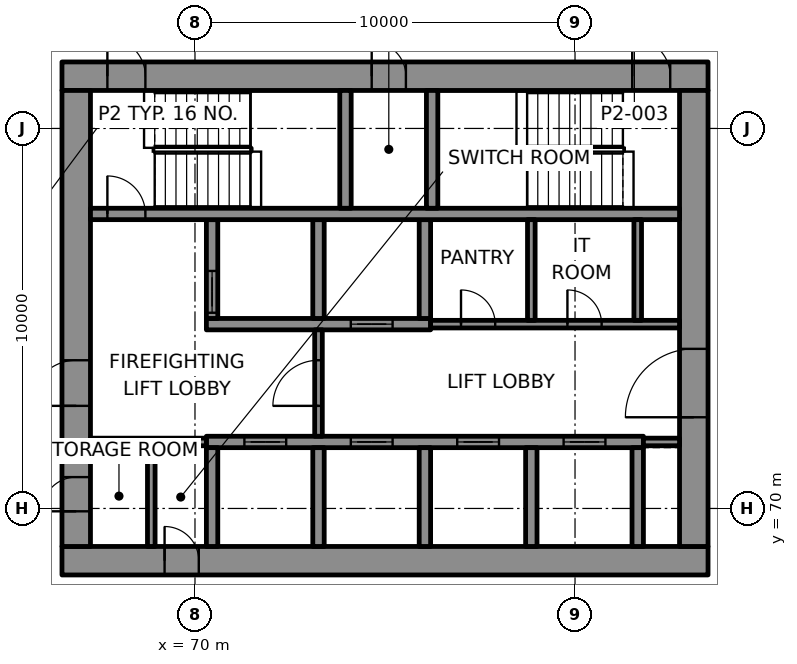
"""IFC4 building model, lengths in metres.
Left out: names, types, materials, properties, quantities, classifications, styles, units other than length and angle.
Written with IfcOpenShell. Run it as: python <this file> out.ifc"""

import sys

from ifc_helpers import new_model, si_unit, direction, frame, frame_2d, origin, place, context, subcontext, project, spatial, rectangle, extrude, element, fill, save


model = new_model("IFC4")
c1 = context("Model", 3, precision=1e-05, world=origin(), true_north=direction((0.0, 1.0)))
c2 = subcontext(c1, "Body", "Model", "MODEL_VIEW")
j1 = project(units=[si_unit("LENGTHUNIT", "METRE"), si_unit("PLANEANGLEUNIT", "RADIAN")], contexts=[c1])
p1 = place(None, origin())
s1 = spatial("IfcSite", under=j1, at=p1, CompositionType="ELEMENT")
p2 = place(p1, origin())
s2 = spatial("IfcBuilding", under=s1, at=p2, CompositionType="ELEMENT")
p3 = place(p2, frame((0.0, 0.0, 305.6)))
s3 = spatial("IfcBuildingStorey", under=s2, at=p3, CompositionType="ELEMENT", Elevation=305.6)
p4 = place(p3, frame((66.5, 68.625, 0.0), z_axis=(0.0, 0.0, 1.0), x_axis=(1.0, 0.0, 0.0)))
e1 = element("IfcWall", 1, at=p4, inside=s3, PredefinedType="SHEAR", context=c2, shape_type="SweptSolid", body=[
    extrude(rectangle(XDim=17.0, YDim=0.75, at=frame_2d((8.5, 0.0))), origin(), (0.0, 0.0, 1.0), 3.3),
])
p5 = place(p4, frame((2.7, 0.0, 0.0)))
e2 = element("IfcOpeningElement", 2, at=p5, cuts=e1, PredefinedType="OPENING", context=c2, shape_type="SweptSolid", body=[
    extrude(rectangle(XDim=0.9, YDim=2.1, at=frame_2d((0.45, 1.05))), frame((0.0, 0.385, 0.0), z_axis=(0.0, -1.0, 0.0), x_axis=(1.0, 0.0, 0.0)), (0.0, 0.0, 1.0), 0.77),
])
p6 = place(p3, frame((66.5, 81.375, 0.0), z_axis=(0.0, 0.0, 1.0), x_axis=(1.0, 0.0, 0.0)))
e3 = element("IfcWall", 3, at=p6, inside=s3, PredefinedType="SHEAR", context=c2, shape_type="SweptSolid", body=[
    extrude(rectangle(XDim=17.0, YDim=0.75, at=frame_2d((8.5, 0.0))), origin(), (0.0, 0.0, 1.0), 3.3),
])
p7 = place(p6, frame((1.195, 0.0, 0.0)))
e4 = element("IfcOpeningElement", 4, at=p7, cuts=e3, PredefinedType="OPENING", context=c2, shape_type="SweptSolid", body=[
    extrude(rectangle(XDim=1.0, YDim=2.1, at=frame_2d((0.5, 1.05))), frame((0.0, 0.385, 0.0), z_axis=(0.0, -1.0, 0.0), x_axis=(1.0, 0.0, 0.0)), (0.0, 0.0, 1.0), 0.77),
])
p8 = place(p6, frame((15.005, 0.0, 0.0)))
e5 = element("IfcOpeningElement", 5, at=p8, cuts=e3, PredefinedType="OPENING", context=c2, shape_type="SweptSolid", body=[
    extrude(rectangle(XDim=1.0, YDim=2.1, at=frame_2d((0.5, 1.05))), frame((0.0, 0.385, 0.0), z_axis=(0.0, -1.0, 0.0), x_axis=(1.0, 0.0, 0.0)), (0.0, 0.0, 1.0), 0.77),
])
p9 = place(p6, frame((8.15, 0.0, 0.0)))
e6 = element("IfcOpeningElement", 6, at=p9, cuts=e3, PredefinedType="OPENING", context=c2, shape_type="SweptSolid", body=[
    extrude(rectangle(XDim=0.9, YDim=2.1, at=frame_2d((0.45, 1.05))), frame((0.0, 0.385, 0.0), z_axis=(0.0, -1.0, 0.0), x_axis=(1.0, 0.0, 0.0)), (0.0, 0.0, 1.0), 0.77),
])
p10 = place(p3, frame((66.875, 69.0, 0.0), z_axis=(0.0, 0.0, 1.0), x_axis=(0.0, 1.0, 0.0)))
e7 = element("IfcWall", 7, at=p10, inside=s3, PredefinedType="SHEAR", context=c2, shape_type="SweptSolid", body=[
    extrude(rectangle(XDim=12.0, YDim=0.75, at=frame_2d((6.0, 0.0))), origin(), (0.0, 0.0, 1.0), 3.3),
])
p11 = place(p10, frame((3.7, 0.0, 0.0)))
e8 = element("IfcOpeningElement", 8, at=p11, cuts=e7, PredefinedType="OPENING", context=c2, shape_type="SweptSolid", body=[
    extrude(rectangle(XDim=1.2, YDim=2.1, at=frame_2d((0.6, 1.05))), frame((0.0, 0.385, 0.0), z_axis=(0.0, -1.0, 0.0), x_axis=(1.0, 0.0, 0.0)), (0.0, 0.0, 1.0), 0.77),
])
p12 = place(p10, frame((0.925, 0.0, 0.0)))
e9 = element("IfcOpeningElement", 9, at=p12, cuts=e7, PredefinedType="OPENING", context=c2, shape_type="SweptSolid", body=[
    extrude(rectangle(XDim=0.9, YDim=2.1, at=frame_2d((0.45, 1.05))), frame((0.0, 0.385, 0.0), z_axis=(0.0, -1.0, 0.0), x_axis=(1.0, 0.0, 0.0)), (0.0, 0.0, 1.0), 0.77),
])
p13 = place(p3, frame((83.125, 69.0, 0.0), z_axis=(0.0, 0.0, 1.0), x_axis=(0.0, 1.0, 0.0)))
e10 = element("IfcWall", 10, at=p13, inside=s3, PredefinedType="SHEAR", context=c2, shape_type="SweptSolid", body=[
    extrude(rectangle(XDim=12.0, YDim=0.75, at=frame_2d((6.0, 0.0))), origin(), (0.0, 0.0, 1.0), 3.3),
])
p14 = place(p13, frame((3.4, 0.0, 0.0)))
e11 = element("IfcOpeningElement", 11, at=p14, cuts=e10, PredefinedType="OPENING", context=c2, shape_type="SweptSolid", body=[
    extrude(rectangle(XDim=1.8, YDim=2.1, at=frame_2d((0.9, 1.05))), frame((0.0, 0.385, 0.0), z_axis=(0.0, -1.0, 0.0), x_axis=(1.0, 0.0, 0.0)), (0.0, 0.0, 1.0), 0.77),
])
p15 = place(p3, frame((70.3, 71.75, 0.0), z_axis=(0.0, 0.0, 1.0), x_axis=(1.0, 0.0, 0.0)))
e12 = element("IfcWall", 12, at=p15, inside=s3, PredefinedType="SHEAR", context=c2, shape_type="SweptSolid", body=[
    extrude(rectangle(XDim=11.5, YDim=0.3, at=frame_2d((5.75, 0.0))), origin(), (0.0, 0.0, 1.0), 3.3),
])
p16 = place(p15, frame((1.0, 0.0, 0.0)))
e13 = element("IfcOpeningElement", 13, at=p16, cuts=e12, PredefinedType="OPENING", context=c2, shape_type="SweptSolid", body=[
    extrude(rectangle(XDim=1.1, YDim=2.1, at=frame_2d((0.55, 1.05))), frame((0.0, 0.16, 0.0), z_axis=(0.0, -1.0, 0.0), x_axis=(1.0, 0.0, 0.0)), (0.0, 0.0, 1.0), 0.32),
])
p17 = place(p15, frame((3.8, 0.0, 0.0)))
e14 = element("IfcOpeningElement", 14, at=p17, cuts=e12, PredefinedType="OPENING", context=c2, shape_type="SweptSolid", body=[
    extrude(rectangle(XDim=1.1, YDim=2.1, at=frame_2d((0.55, 1.05))), frame((0.0, 0.16, 0.0), z_axis=(0.0, -1.0, 0.0), x_axis=(1.0, 0.0, 0.0)), (0.0, 0.0, 1.0), 0.32),
])
p18 = place(p15, frame((6.6, 0.0, 0.0)))
e15 = element("IfcOpeningElement", 15, at=p18, cuts=e12, PredefinedType="OPENING", context=c2, shape_type="SweptSolid", body=[
    extrude(rectangle(XDim=1.1, YDim=2.1, at=frame_2d((0.55, 1.05))), frame((0.0, 0.16, 0.0), z_axis=(0.0, -1.0, 0.0), x_axis=(1.0, 0.0, 0.0)), (0.0, 0.0, 1.0), 0.32),
])
p19 = place(p15, frame((9.4, 0.0, 0.0)))
e16 = element("IfcOpeningElement", 16, at=p19, cuts=e12, PredefinedType="OPENING", context=c2, shape_type="SweptSolid", body=[
    extrude(rectangle(XDim=1.1, YDim=2.1, at=frame_2d((0.55, 1.05))), frame((0.0, 0.16, 0.0), z_axis=(0.0, -1.0, 0.0), x_axis=(1.0, 0.0, 0.0)), (0.0, 0.0, 1.0), 0.32),
])
p20 = place(p3, frame((70.3, 74.85, 0.0), z_axis=(0.0, 0.0, 1.0), x_axis=(1.0, 0.0, 0.0)))
e17 = element("IfcWall", 17, at=p20, inside=s3, PredefinedType="SHEAR", context=c2, shape_type="SweptSolid", body=[
    extrude(rectangle(XDim=5.9, YDim=0.3, at=frame_2d((2.95, 0.0))), origin(), (0.0, 0.0, 1.0), 3.3),
])
p21 = place(p20, frame((3.8, 0.0, 0.0)))
e18 = element("IfcOpeningElement", 18, at=p21, cuts=e17, PredefinedType="OPENING", context=c2, shape_type="SweptSolid", body=[
    extrude(rectangle(XDim=1.1, YDim=2.1, at=frame_2d((0.55, 1.05))), frame((0.0, 0.16, 0.0), z_axis=(0.0, -1.0, 0.0), x_axis=(1.0, 0.0, 0.0)), (0.0, 0.0, 1.0), 0.32),
])
p22 = place(p3, frame((70.45, 69.0, 0.0), z_axis=(0.0, 0.0, 1.0), x_axis=(0.0, 1.0, 0.0)))
e19 = element("IfcWall", 19, at=p22, inside=s3, PredefinedType="SHEAR", context=c2, shape_type="SweptSolid", body=[
    extrude(rectangle(XDim=2.6, YDim=0.3, at=frame_2d((1.3, 0.0))), origin(), (0.0, 0.0, 1.0), 3.3),
])
p23 = place(p3, frame((70.45, 75.0, 0.0), z_axis=(0.0, 0.0, 1.0), x_axis=(0.0, 1.0, 0.0)))
e20 = element("IfcWall", 20, at=p23, inside=s3, PredefinedType="SHEAR", context=c2, shape_type="SweptSolid", body=[
    extrude(rectangle(XDim=2.6, YDim=0.3, at=frame_2d((1.3, 0.0))), origin(), (0.0, 0.0, 1.0), 3.3),
])
p24 = place(p23, frame((0.15, 0.0, 0.0)))
e21 = element("IfcOpeningElement", 21, at=p24, cuts=e20, PredefinedType="OPENING", context=c2, shape_type="SweptSolid", body=[
    extrude(rectangle(XDim=1.1, YDim=2.1, at=frame_2d((0.55, 1.05))), frame((0.0, 0.16, 0.0), z_axis=(0.0, -1.0, 0.0), x_axis=(1.0, 0.0, 0.0)), (0.0, 0.0, 1.0), 0.32),
])
for number, where, z_axis, x_axis in (
    (22, (73.25, 69.0, 0.0), (0.0, 0.0, 1.0), (0.0, 1.0, 0.0)),
    (23, (73.25, 75.0, 0.0), (0.0, 0.0, 1.0), (0.0, 1.0, 0.0)),
    (24, (76.05, 69.0, 0.0), (0.0, 0.0, 1.0), (0.0, 1.0, 0.0)),
    (25, (76.05, 75.0, 0.0), (0.0, 0.0, 1.0), (0.0, 1.0, 0.0)),
    (26, (78.85, 69.0, 0.0), (0.0, 0.0, 1.0), (0.0, 1.0, 0.0)),
    (27, (81.65, 69.0, 0.0), (0.0, 0.0, 1.0), (0.0, 1.0, 0.0)),
):
    element("IfcWall", number, at=place(p3, frame(where, z_axis=z_axis, x_axis=x_axis)), inside=s3, PredefinedType="SHEAR", context=c2, shape_type="SweptSolid", body=[
        extrude(rectangle(XDim=2.6, YDim=0.3, at=frame_2d((1.3, 0.0))), origin(), (0.0, 0.0, 1.0), 3.3),
    ])
p25 = place(p3, frame((67.25, 77.75, 0.0), z_axis=(0.0, 0.0, 1.0), x_axis=(1.0, 0.0, 0.0)))
e28 = element("IfcWall", 28, at=p25, inside=s3, PredefinedType="SHEAR", context=c2, shape_type="SweptSolid", body=[
    extrude(rectangle(XDim=15.5, YDim=0.3, at=frame_2d((7.75, 0.0))), origin(), (0.0, 0.0, 1.0), 3.3),
])
p26 = place(p25, frame((0.445, 0.0, 0.0)))
e29 = element("IfcOpeningElement", 29, at=p26, cuts=e28, PredefinedType="OPENING", context=c2, shape_type="SweptSolid", body=[
    extrude(rectangle(XDim=1.0, YDim=2.1, at=frame_2d((0.5, 1.05))), frame((0.0, 0.16, 0.0), z_axis=(0.0, -1.0, 0.0), x_axis=(1.0, 0.0, 0.0)), (0.0, 0.0, 1.0), 0.32),
])
for number, where, z_axis, x_axis in (
    (30, (73.96, 77.9, 0.0), (0.0, 0.0, 1.0), (0.0, 1.0, 0.0)),
    (31, (76.24, 77.9, 0.0), (0.0, 0.0, 1.0), (0.0, 1.0, 0.0)),
):
    element("IfcWall", number, at=place(p3, frame(where, z_axis=z_axis, x_axis=x_axis)), inside=s3, PredefinedType="SHEAR", context=c2, shape_type="SweptSolid", body=[
        extrude(rectangle(XDim=3.1, YDim=0.3, at=frame_2d((1.55, 0.0))), origin(), (0.0, 0.0, 1.0), 3.3),
    ])
p27 = place(p3, frame((67.25, 71.75, 0.0), z_axis=(0.0, 0.0, 1.0), x_axis=(1.0, 0.0, 0.0)))
e32 = element("IfcWall", 32, at=p27, inside=s3, PredefinedType="PARTITIONING", context=c2, shape_type="SweptSolid", body=[
    extrude(rectangle(XDim=3.05, YDim=0.2, at=frame_2d((1.525, 0.0))), origin(), (0.0, 0.0, 1.0), 3.3),
])
p28 = place(p3, frame((81.8, 71.75, 0.0), z_axis=(0.0, 0.0, 1.0), x_axis=(1.0, 0.0, 0.0)))
e33 = element("IfcWall", 33, at=p28, inside=s3, PredefinedType="PARTITIONING", context=c2, shape_type="SweptSolid", body=[
    extrude(rectangle(XDim=0.95, YDim=0.2, at=frame_2d((0.475, 0.0))), origin(), (0.0, 0.0, 1.0), 3.3),
])
p29 = place(p3, frame((76.2, 74.85, 0.0), z_axis=(0.0, 0.0, 1.0), x_axis=(1.0, 0.0, 0.0)))
e34 = element("IfcWall", 34, at=p29, inside=s3, PredefinedType="PARTITIONING", context=c2, shape_type="SweptSolid", body=[
    extrude(rectangle(XDim=6.55, YDim=0.2, at=frame_2d((3.275, 0.0))), origin(), (0.0, 0.0, 1.0), 3.3),
])
p30 = place(p29, frame((0.8, 0.0, 0.0)))
e35 = element("IfcOpeningElement", 35, at=p30, cuts=e34, PredefinedType="OPENING", context=c2, shape_type="SweptSolid", body=[
    extrude(rectangle(XDim=0.9, YDim=2.1, at=frame_2d((0.45, 1.05))), frame((0.0, 0.11, 0.0), z_axis=(0.0, -1.0, 0.0), x_axis=(1.0, 0.0, 0.0)), (0.0, 0.0, 1.0), 0.22),
])
p31 = place(p29, frame((3.6, 0.0, 0.0)))
e36 = element("IfcOpeningElement", 36, at=p31, cuts=e34, PredefinedType="OPENING", context=c2, shape_type="SweptSolid", body=[
    extrude(rectangle(XDim=0.9, YDim=2.1, at=frame_2d((0.45, 1.05))), frame((0.0, 0.11, 0.0), z_axis=(0.0, -1.0, 0.0), x_axis=(1.0, 0.0, 0.0)), (0.0, 0.0, 1.0), 0.22),
])
p32 = place(p3, frame((68.85, 69.0, 0.0), z_axis=(0.0, 0.0, 1.0), x_axis=(0.0, 1.0, 0.0)))
e37 = element("IfcWall", 37, at=p32, inside=s3, PredefinedType="PARTITIONING", context=c2, shape_type="SweptSolid", body=[
    extrude(rectangle(XDim=2.65, YDim=0.2, at=frame_2d((1.325, 0.0))), origin(), (0.0, 0.0, 1.0), 3.3),
])
p33 = place(p3, frame((73.25, 71.9, 0.0), z_axis=(0.0, 0.0, 1.0), x_axis=(0.0, 1.0, 0.0)))
e38 = element("IfcWall", 38, at=p33, inside=s3, PredefinedType="PARTITIONING", context=c2, shape_type="SweptSolid", body=[
    extrude(rectangle(XDim=2.8, YDim=0.2, at=frame_2d((1.4, 0.0))), origin(), (0.0, 0.0, 1.0), 3.3),
])
p34 = place(p33, frame((0.8, 0.0, 0.0)))
e39 = element("IfcOpeningElement", 39, at=p34, cuts=e38, PredefinedType="OPENING", context=c2, shape_type="SweptSolid", body=[
    extrude(rectangle(XDim=1.2, YDim=2.1, at=frame_2d((0.6, 1.05))), frame((0.0, 0.11, 0.0), z_axis=(0.0, -1.0, 0.0), x_axis=(1.0, 0.0, 0.0)), (0.0, 0.0, 1.0), 0.22),
])
for number, where, z_axis, x_axis in (
    (40, (78.85, 74.95, 0.0), (0.0, 0.0, 1.0), (0.0, 1.0, 0.0)),
    (41, (81.65, 74.95, 0.0), (0.0, 0.0, 1.0), (0.0, 1.0, 0.0)),
):
    element("IfcWall", number, at=place(p3, frame(where, z_axis=z_axis, x_axis=x_axis)), inside=s3, PredefinedType="PARTITIONING", context=c2, shape_type="SweptSolid", body=[
        extrude(rectangle(XDim=2.65, YDim=0.2, at=frame_2d((1.325, 0.0))), origin(), (0.0, 0.0, 1.0), 3.3),
    ])
p35 = place(p16, origin())
e42 = element("IfcDoor", 42, at=p35, inside=s3, OperationType="DOUBLE_DOOR_SLIDING", PredefinedType="DOOR", context=c2, shape_type="SweptSolid", body=[
    extrude(rectangle(XDim=1.1, YDim=2.1, at=frame_2d((0.55, 1.05))), frame((0.0, 0.025, 0.0), z_axis=(0.0, -1.0, 0.0), x_axis=(1.0, 0.0, 0.0)), (0.0, 0.0, 1.0), 0.05),
])
fill(e13, e42)
p36 = place(p17, origin())
e43 = element("IfcDoor", 43, at=p36, inside=s3, OperationType="DOUBLE_DOOR_SLIDING", PredefinedType="DOOR", context=c2, shape_type="SweptSolid", body=[
    extrude(rectangle(XDim=1.1, YDim=2.1, at=frame_2d((0.55, 1.05))), frame((0.0, 0.025, 0.0), z_axis=(0.0, -1.0, 0.0), x_axis=(1.0, 0.0, 0.0)), (0.0, 0.0, 1.0), 0.05),
])
fill(e14, e43)
p37 = place(p18, origin())
e44 = element("IfcDoor", 44, at=p37, inside=s3, OperationType="DOUBLE_DOOR_SLIDING", PredefinedType="DOOR", context=c2, shape_type="SweptSolid", body=[
    extrude(rectangle(XDim=1.1, YDim=2.1, at=frame_2d((0.55, 1.05))), frame((0.0, 0.025, 0.0), z_axis=(0.0, -1.0, 0.0), x_axis=(1.0, 0.0, 0.0)), (0.0, 0.0, 1.0), 0.05),
])
fill(e15, e44)
p38 = place(p19, origin())
e45 = element("IfcDoor", 45, at=p38, inside=s3, OperationType="DOUBLE_DOOR_SLIDING", PredefinedType="DOOR", context=c2, shape_type="SweptSolid", body=[
    extrude(rectangle(XDim=1.1, YDim=2.1, at=frame_2d((0.55, 1.05))), frame((0.0, 0.025, 0.0), z_axis=(0.0, -1.0, 0.0), x_axis=(1.0, 0.0, 0.0)), (0.0, 0.0, 1.0), 0.05),
])
fill(e16, e45)
p39 = place(p24, origin())
e46 = element("IfcDoor", 46, at=p39, inside=s3, OperationType="DOUBLE_DOOR_SLIDING", PredefinedType="DOOR", context=c2, shape_type="SweptSolid", body=[
    extrude(rectangle(XDim=1.1, YDim=2.1, at=frame_2d((0.55, 1.05))), frame((0.0, 0.025, 0.0), z_axis=(0.0, -1.0, 0.0), x_axis=(1.0, 0.0, 0.0)), (0.0, 0.0, 1.0), 0.05),
])
fill(e21, e46)
p40 = place(p21, origin())
e47 = element("IfcDoor", 47, at=p40, inside=s3, OperationType="DOUBLE_DOOR_SLIDING", PredefinedType="DOOR", context=c2, shape_type="SweptSolid", body=[
    extrude(rectangle(XDim=1.1, YDim=2.1, at=frame_2d((0.55, 1.05))), frame((0.0, 0.025, 0.0), z_axis=(0.0, -1.0, 0.0), x_axis=(1.0, 0.0, 0.0)), (0.0, 0.0, 1.0), 0.05),
])
fill(e18, e47)
p41 = place(p26, origin())
e48 = element("IfcDoor", 48, at=p41, inside=s3, OperationType="SINGLE_SWING_LEFT", PredefinedType="DOOR", context=c2, shape_type="SweptSolid", body=[
    extrude(rectangle(XDim=1.0, YDim=2.1, at=frame_2d((0.5, 1.05))), frame((0.0, 0.025, 0.0), z_axis=(0.0, -1.0, 0.0), x_axis=(1.0, 0.0, 0.0)), (0.0, 0.0, 1.0), 0.05),
])
fill(e29, e48)
p42 = place(p7, origin())
e49 = element("IfcDoor", 49, at=p42, inside=s3, OperationType="SINGLE_SWING_RIGHT", PredefinedType="DOOR", context=c2, shape_type="SweptSolid", body=[
    extrude(rectangle(XDim=1.0, YDim=2.1, at=frame_2d((0.5, 1.05))), frame((0.0, 0.095, 0.0), z_axis=(0.0, -1.0, 0.0), x_axis=(1.0, 0.0, 0.0)), (0.0, 0.0, 1.0), 0.19),
])
fill(e4, e49)
p43 = place(p8, origin())
e50 = element("IfcDoor", 50, at=p43, inside=s3, OperationType="SINGLE_SWING_LEFT", PredefinedType="DOOR", context=c2, shape_type="SweptSolid", body=[
    extrude(rectangle(XDim=1.0, YDim=2.1, at=frame_2d((0.5, 1.05))), frame((0.0, 0.095, 0.0), z_axis=(0.0, -1.0, 0.0), x_axis=(1.0, 0.0, 0.0)), (0.0, 0.0, 1.0), 0.19),
])
fill(e5, e50)
p44 = place(p34, origin())
e51 = element("IfcDoor", 51, at=p44, inside=s3, OperationType="SINGLE_SWING_LEFT", PredefinedType="DOOR", context=c2, shape_type="SweptSolid", body=[
    extrude(rectangle(XDim=1.2, YDim=2.1, at=frame_2d((0.6, 1.05))), frame((0.0, 0.025, 0.0), z_axis=(0.0, -1.0, 0.0), x_axis=(1.0, 0.0, 0.0)), (0.0, 0.0, 1.0), 0.05),
])
fill(e39, e51)
p45 = place(p11, origin())
e52 = element("IfcDoor", 52, at=p45, inside=s3, OperationType="SINGLE_SWING_RIGHT", PredefinedType="DOOR", context=c2, shape_type="SweptSolid", body=[
    extrude(rectangle(XDim=1.2, YDim=2.1, at=frame_2d((0.6, 1.05))), frame((0.0, 0.095, 0.0), z_axis=(0.0, -1.0, 0.0), x_axis=(1.0, 0.0, 0.0)), (0.0, 0.0, 1.0), 0.19),
])
fill(e8, e52)
p46 = place(p14, origin())
e53 = element("IfcDoor", 53, at=p46, inside=s3, OperationType="SINGLE_SWING_LEFT", PredefinedType="DOOR", context=c2, shape_type="SweptSolid", body=[
    extrude(rectangle(XDim=1.8, YDim=2.1, at=frame_2d((0.9, 1.05))), frame((0.0, 0.095, 0.0), z_axis=(0.0, -1.0, 0.0), x_axis=(1.0, 0.0, 0.0)), (0.0, 0.0, 1.0), 0.19),
])
fill(e11, e53)
p47 = place(p12, origin())
e54 = element("IfcDoor", 54, at=p47, inside=s3, OperationType="SINGLE_SWING_RIGHT", PredefinedType="DOOR", context=c2, shape_type="SweptSolid", body=[
    extrude(rectangle(XDim=0.9, YDim=2.1, at=frame_2d((0.45, 1.05))), frame((0.0, 0.095, 0.0), z_axis=(0.0, -1.0, 0.0), x_axis=(1.0, 0.0, 0.0)), (0.0, 0.0, 1.0), 0.19),
])
fill(e9, e54)
p48 = place(p5, origin())
e55 = element("IfcDoor", 55, at=p48, inside=s3, OperationType="SINGLE_SWING_LEFT", PredefinedType="DOOR", context=c2, shape_type="SweptSolid", body=[
    extrude(rectangle(XDim=0.9, YDim=2.1, at=frame_2d((0.45, 1.05))), frame((0.0, 0.095, 0.0), z_axis=(0.0, -1.0, 0.0), x_axis=(1.0, 0.0, 0.0)), (0.0, 0.0, 1.0), 0.19),
])
fill(e2, e55)
p49 = place(p30, origin())
e56 = element("IfcDoor", 56, at=p49, inside=s3, OperationType="SINGLE_SWING_RIGHT", PredefinedType="DOOR", context=c2, shape_type="SweptSolid", body=[
    extrude(rectangle(XDim=0.9, YDim=2.1, at=frame_2d((0.45, 1.05))), frame((0.0, 0.025, 0.0), z_axis=(0.0, -1.0, 0.0), x_axis=(1.0, 0.0, 0.0)), (0.0, 0.0, 1.0), 0.05),
])
fill(e35, e56)
p50 = place(p31, origin())
e57 = element("IfcDoor", 57, at=p50, inside=s3, OperationType="SINGLE_SWING_LEFT", PredefinedType="DOOR", context=c2, shape_type="SweptSolid", body=[
    extrude(rectangle(XDim=0.9, YDim=2.1, at=frame_2d((0.45, 1.05))), frame((0.0, 0.025, 0.0), z_axis=(0.0, -1.0, 0.0), x_axis=(1.0, 0.0, 0.0)), (0.0, 0.0, 1.0), 0.05),
])
fill(e36, e57)
p51 = place(p9, origin())
e58 = element("IfcDoor", 58, at=p51, inside=s3, OperationType="SINGLE_SWING_RIGHT", PredefinedType="DOOR", context=c2, shape_type="SweptSolid", body=[
    extrude(rectangle(XDim=0.9, YDim=2.1, at=frame_2d((0.45, 1.05))), frame((0.0, 0.095, 0.0), z_axis=(0.0, -1.0, 0.0), x_axis=(1.0, 0.0, 0.0)), (0.0, 0.0, 1.0), 0.19),
])
fill(e6, e58)
save(model, sys.argv[1])
